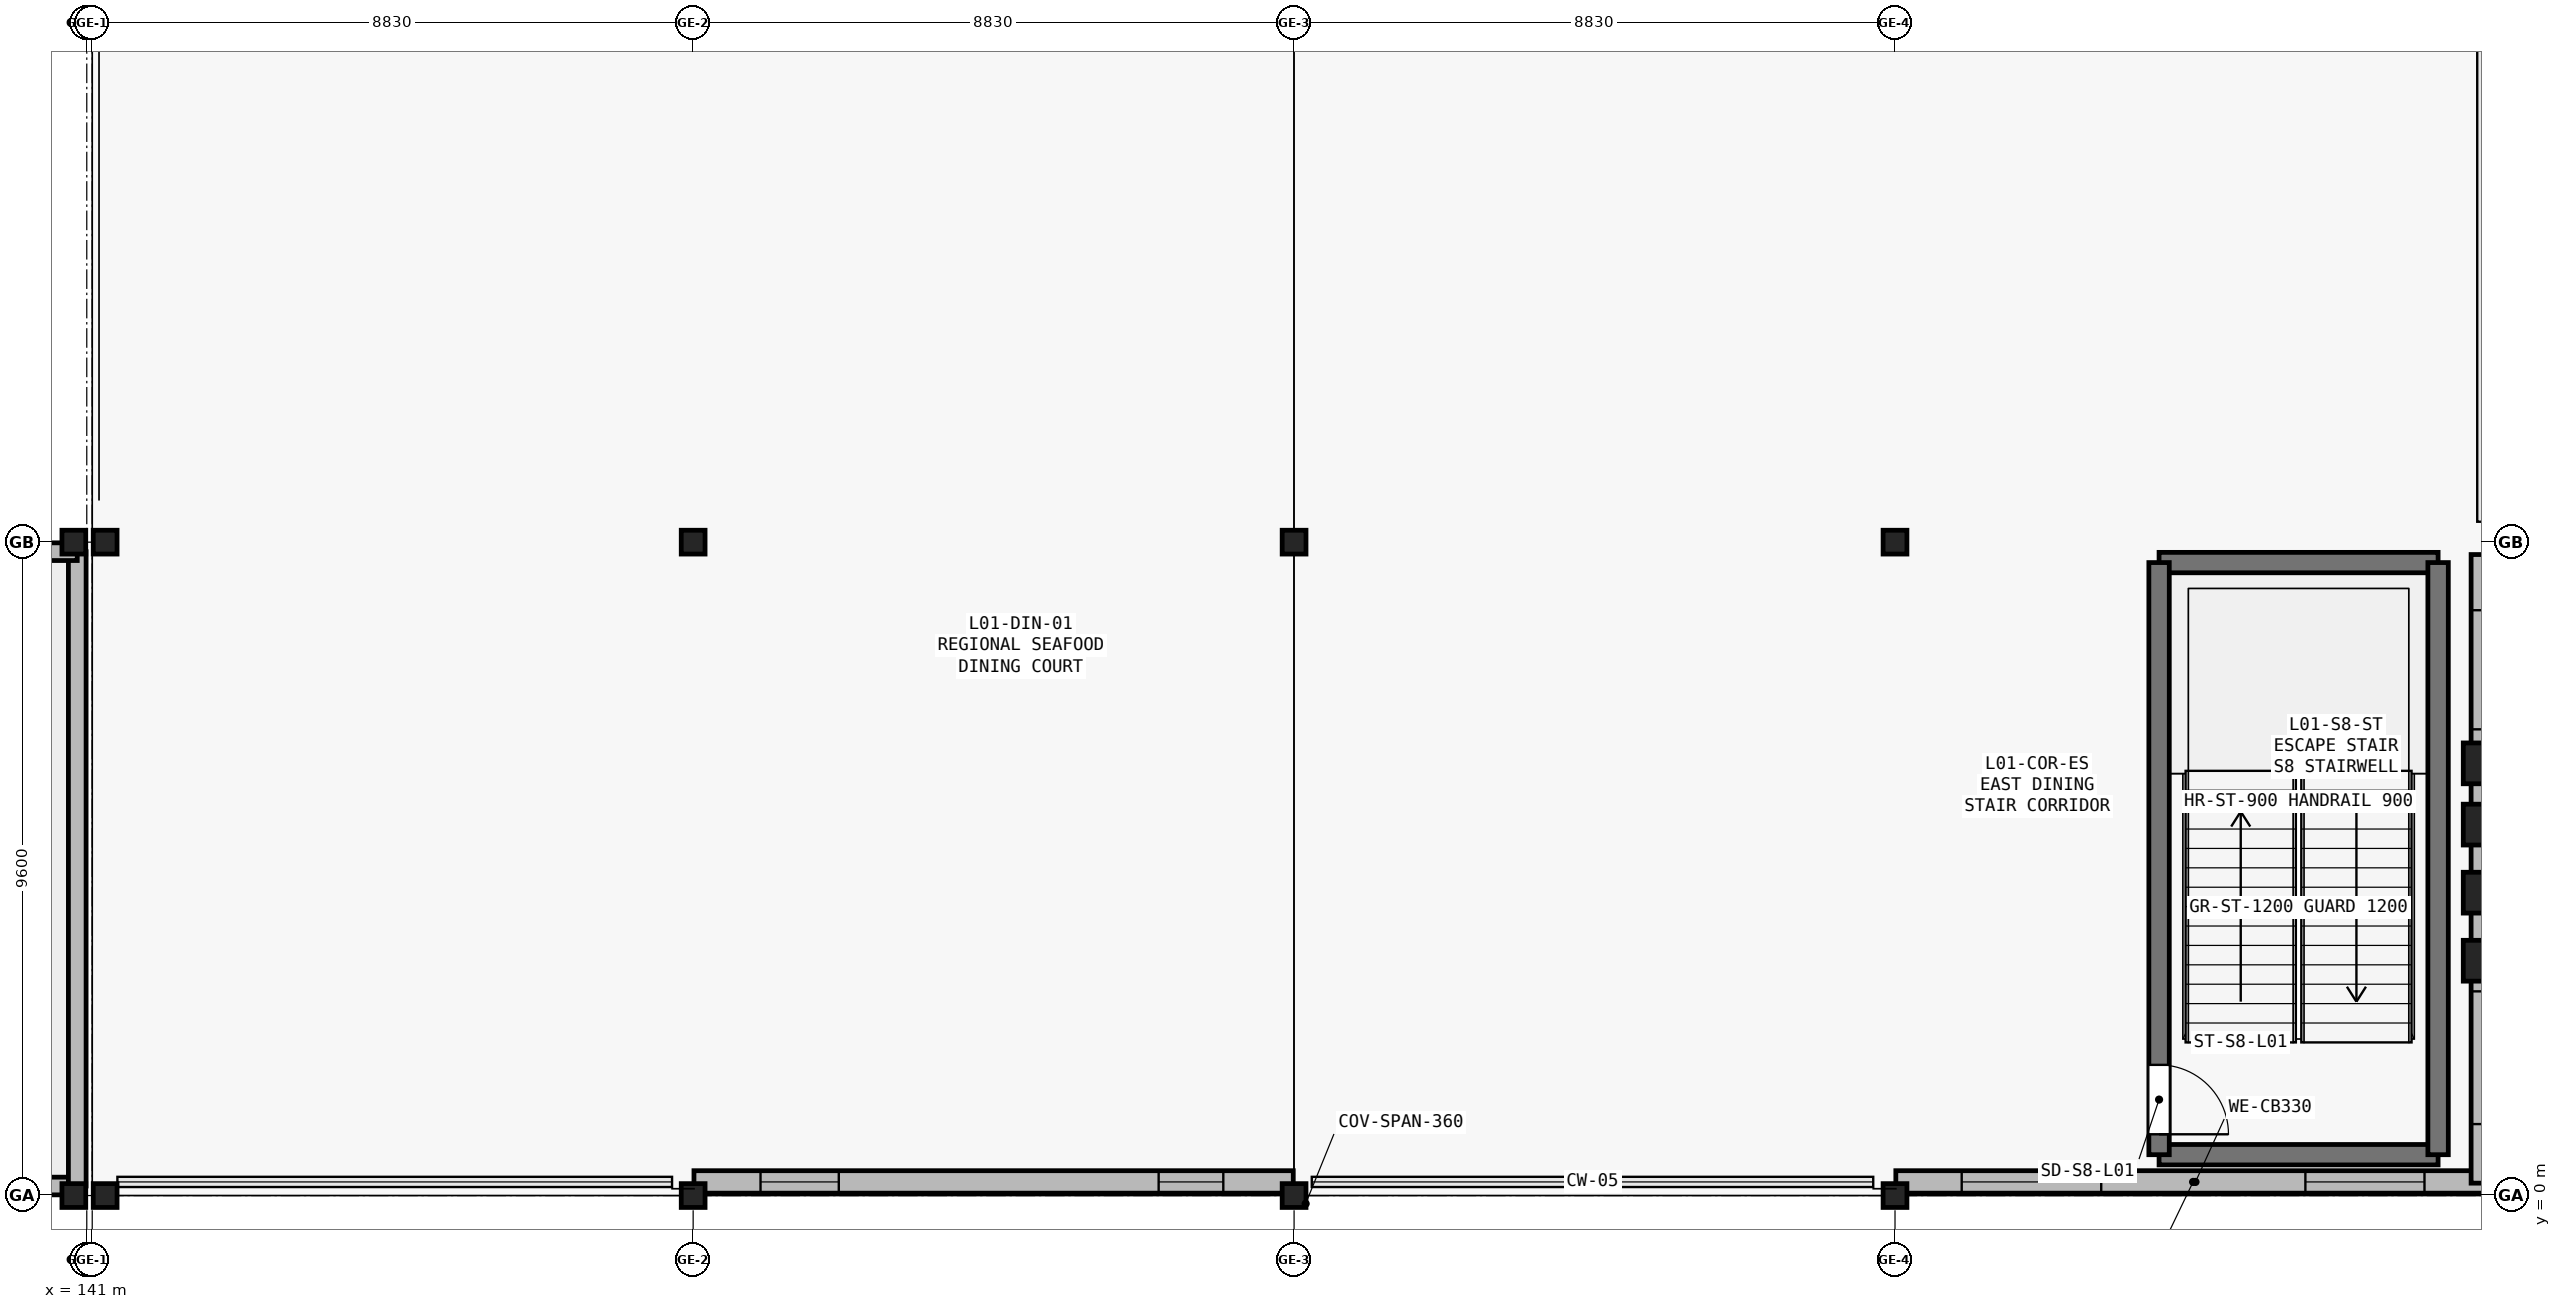
"""IFC4 building model, lengths in metres.
Left out: names, types, materials, properties, quantities, classifications, styles, units other than length and angle.
Written with IfcOpenShell. Run it as: python <this file> out.ifc"""

import sys

from ifc_helpers import new_model, si_unit, direction, frame, frame_2d, origin, origin_2d, place, context, subcontext, project, spatial, rectangle, i_section, extrude, element, fill, save


model = new_model("IFC4")
c1 = context("Model", 3, precision=1e-05, world=origin(), true_north=direction((0.0, 1.0)))
c2 = subcontext(c1, "Body", "Model", "MODEL_VIEW")
j1 = project(units=[si_unit("LENGTHUNIT", "METRE"), si_unit("PLANEANGLEUNIT", "RADIAN")], contexts=[c1])
p1 = place(None, origin())
s1 = spatial("IfcSite", under=j1, at=p1, CompositionType="ELEMENT")
p2 = place(p1, origin())
s2 = spatial("IfcBuilding", under=s1, at=p2, CompositionType="ELEMENT")
p3 = place(p2, frame((0.0, 0.0, 6.0)))
s3 = spatial("IfcBuildingStorey", under=s2, at=p3, CompositionType="ELEMENT", Elevation=6.0)
for number, where, z_axis, x_axis in (
    (1, (140.81, 0.0, 0.0), (0.0, 0.0, 1.0), (1.0, 0.0, 0.0)),
    (2, (140.81, 9.6, 0.0), (0.0, 0.0, 1.0), (1.0, 0.0, 0.0)),
    (3, (141.27, 0.0, 0.0), (0.0, 0.0, 1.0), (1.0, 0.0, 0.0)),
    (4, (141.27, 9.6, 0.0), (0.0, 0.0, 1.0), (1.0, 0.0, 0.0)),
    (5, (149.91, 0.0, 0.0), (0.0, 0.0, 1.0), (1.0, 0.0, 0.0)),
    (6, (149.91, 9.6, 0.0), (0.0, 0.0, 1.0), (1.0, 0.0, 0.0)),
    (7, (158.74, 0.0, 0.0), (0.0, 0.0, 1.0), (1.0, 0.0, 0.0)),
    (8, (158.74, 9.6, 0.0), (0.0, 0.0, 1.0), (1.0, 0.0, 0.0)),
    (9, (167.57, 0.0, 0.0), (0.0, 0.0, 1.0), (1.0, 0.0, 0.0)),
    (10, (167.57, 9.6, 0.0), (0.0, 0.0, 1.0), (1.0, 0.0, 0.0)),
):
    element("IfcColumn", number, at=place(p3, frame(where, z_axis=z_axis, x_axis=x_axis)), inside=s3, PredefinedType="COLUMN", context=c2, shape_type="SweptSolid", body=[
        extrude(i_section(OverallWidth=0.35, OverallDepth=0.35, WebThickness=0.012, FlangeThickness=0.019, FilletRadius=0.02, at=origin_2d()), origin(), (0.0, 0.0, 1.0), 4.8),
    ])
for number, where, z_axis, x_axis in (
    (11, (176.22, 3.45, 0.0), (0.0, 0.0, 1.0), (1.0, 0.0, 0.0)),
    (12, (176.22, 4.45, 0.0), (0.0, 0.0, 1.0), (1.0, 0.0, 0.0)),
    (13, (176.22, 5.45, 0.0), (0.0, 0.0, 1.0), (1.0, 0.0, 0.0)),
    (14, (176.22, 6.35, 0.0), (0.0, 0.0, 1.0), (1.0, 0.0, 0.0)),
):
    element("IfcColumn", number, at=place(p3, frame(where, z_axis=z_axis, x_axis=x_axis)), inside=s3, PredefinedType="PILASTER", context=c2, shape_type="SweptSolid", body=[
        extrude(rectangle(XDim=0.6, YDim=0.6, at=origin_2d()), origin(), (0.0, 0.0, 1.0), 4.55),
    ])
p4 = place(p3, frame((176.388, 0.2, 0.0), z_axis=(0.0, 0.0, 1.0), x_axis=(-1.0, 0.0, 0.0)))
e15 = element("IfcWall", 15, at=p4, inside=s3, PredefinedType="SOLIDWALL", context=c2, shape_type="SweptSolid", body=[
    extrude(rectangle(XDim=8.806, YDim=0.33, at=frame_2d((4.403, 0.0))), origin(), (0.0, 0.0, 1.0), 3.95),
])
p5 = place(p4, frame((1.038, 0.0, 0.95)))
e16 = element("IfcOpeningElement", 16, at=p5, cuts=e15, PredefinedType="OPENING", context=c2, shape_type="SweptSolid", body=[
    extrude(rectangle(XDim=1.75, YDim=1.5, at=frame_2d((0.875, 0.75))), frame((0.0, 0.175, 0.0), z_axis=(0.0, -1.0, 0.0), x_axis=(1.0, 0.0, 0.0)), (0.0, 0.0, 1.0), 0.35),
])
p6 = place(p4, frame((5.788, 0.0, 0.95)))
e17 = element("IfcOpeningElement", 17, at=p6, cuts=e15, PredefinedType="OPENING", context=c2, shape_type="SweptSolid", body=[
    extrude(rectangle(XDim=2.05, YDim=1.5, at=frame_2d((1.025, 0.75))), frame((0.0, 0.175, 0.0), z_axis=(0.0, -1.0, 0.0), x_axis=(1.0, 0.0, 0.0)), (0.0, 0.0, 1.0), 0.35),
])
p7 = place(p3, frame((158.728, 0.2, 0.0), z_axis=(0.0, 0.0, 1.0), x_axis=(-1.0, 0.0, 0.0)))
e18 = element("IfcWall", 18, at=p7, inside=s3, PredefinedType="SOLIDWALL", context=c2, shape_type="SweptSolid", body=[
    extrude(rectangle(XDim=8.806, YDim=0.33, at=frame_2d((4.403, 0.0))), origin(), (0.0, 0.0, 1.0), 3.95),
])
p8 = place(p7, frame((1.028, 0.0, 0.95)))
e19 = element("IfcOpeningElement", 19, at=p8, cuts=e18, PredefinedType="OPENING", context=c2, shape_type="SweptSolid", body=[
    extrude(rectangle(XDim=0.95, YDim=1.65, at=frame_2d((0.475, 0.825))), frame((0.0, 0.175, 0.0), z_axis=(0.0, -1.0, 0.0), x_axis=(1.0, 0.0, 0.0)), (0.0, 0.0, 1.0), 0.35),
])
p9 = place(p7, frame((6.678, 0.0, 0.95)))
e20 = element("IfcOpeningElement", 20, at=p9, cuts=e18, PredefinedType="OPENING", context=c2, shape_type="SweptSolid", body=[
    extrude(rectangle(XDim=1.15, YDim=1.65, at=frame_2d((0.575, 0.825))), frame((0.0, 0.175, 0.0), z_axis=(0.0, -1.0, 0.0), x_axis=(1.0, 0.0, 0.0)), (0.0, 0.0, 1.0), 0.35),
])
p10 = place(p3, frame((176.2, 9.418, 0.0), z_axis=(0.0, 0.0, 1.0), x_axis=(0.0, -1.0, 0.0)))
e21 = element("IfcWall", 21, at=p10, inside=s3, PredefinedType="SOLIDWALL", context=c2, shape_type="SweptSolid", body=[
    extrude(rectangle(XDim=9.236, YDim=0.33, at=frame_2d((4.618, 0.0))), origin(), (0.0, 0.0, 1.0), 3.95),
])
p11 = place(p10, frame((0.818, 0.0, 0.95)))
e22 = element("IfcOpeningElement", 22, at=p11, cuts=e21, PredefinedType="OPENING", context=c2, shape_type="SweptSolid", body=[
    extrude(rectangle(XDim=1.75, YDim=1.65, at=frame_2d((0.875, 0.825))), frame((0.0, 0.175, 0.0), z_axis=(0.0, -1.0, 0.0), x_axis=(1.0, 0.0, 0.0)), (0.0, 0.0, 1.0), 0.35),
])
p12 = place(p10, frame((6.418, 0.0, 0.95)))
e23 = element("IfcOpeningElement", 23, at=p12, cuts=e21, PredefinedType="OPENING", context=c2, shape_type="SweptSolid", body=[
    extrude(rectangle(XDim=1.95, YDim=1.65, at=frame_2d((0.975, 0.825))), frame((0.0, 0.175, 0.0), z_axis=(0.0, -1.0, 0.0), x_axis=(1.0, 0.0, 0.0)), (0.0, 0.0, 1.0), 0.35),
])
p13 = place(p3, frame((112.34, 0.14, 0.01), z_axis=(0.0, 0.0, 1.0), x_axis=(1.0, 0.0, 0.0)))
e24 = element("IfcWall", 24, at=p13, inside=s3, PredefinedType="PARAPET", context=c2, shape_type="SweptSolid", body=[
    extrude(rectangle(XDim=28.52, YDim=0.26, at=frame_2d((14.26, 0.0))), origin(), (0.0, 0.0, 1.0), 1.15),
])
p14 = place(p3, frame((140.86, 0.14, 0.01), z_axis=(0.0, 0.0, 1.0), x_axis=(0.0, 1.0, 0.0)))
e25 = element("IfcWall", 25, at=p14, inside=s3, PredefinedType="PARAPET", context=c2, shape_type="SweptSolid", body=[
    extrude(rectangle(XDim=9.32, YDim=0.26, at=frame_2d((4.66, 0.0))), origin(), (0.0, 0.0, 1.0), 1.15),
])
p15 = place(p3, frame((140.86, 9.46, 0.01), z_axis=(0.0, 0.0, 1.0), x_axis=(-1.0, 0.0, 0.0)))
e26 = element("IfcWall", 26, at=p15, inside=s3, PredefinedType="PARAPET", context=c2, shape_type="SweptSolid", body=[
    extrude(rectangle(XDim=28.52, YDim=0.26, at=frame_2d((14.26, 0.0))), origin(), (0.0, 0.0, 1.0), 1.15),
])
for number, where, z_axis, x_axis in (
    (27, (171.45, 0.6, 0.0), (0.0, 0.0, 1.0), (1.0, 0.0, 0.0)),
    (28, (175.55, 9.3, 0.0), (0.0, 0.0, 1.0), (-1.0, 0.0, 0.0)),
):
    element("IfcWall", number, at=place(p3, frame(where, z_axis=z_axis, x_axis=x_axis)), inside=s3, PredefinedType="SHEAR", context=c2, shape_type="SweptSolid", body=[
        extrude(rectangle(XDim=4.1, YDim=0.3, at=frame_2d((2.05, 0.0))), origin(), (0.0, 0.0, 1.0), 4.8),
    ])
p16 = place(p3, frame((171.45, 9.3, 0.0), z_axis=(0.0, 0.0, 1.0), x_axis=(0.0, -1.0, 0.0)))
e29 = element("IfcWall", 29, at=p16, inside=s3, PredefinedType="SHEAR", context=c2, shape_type="SweptSolid", body=[
    extrude(rectangle(XDim=8.7, YDim=0.3, at=frame_2d((4.35, 0.0))), origin(), (0.0, 0.0, 1.0), 4.8),
])
p17 = place(p16, frame((7.38, 0.0, 0.0)))
e30 = element("IfcOpeningElement", 30, at=p17, cuts=e29, PredefinedType="OPENING", context=c2, shape_type="SweptSolid", body=[
    extrude(rectangle(XDim=1.02, YDim=2.1, at=frame_2d((0.51, 1.05))), frame((0.0, 0.16, 0.0), z_axis=(0.0, -1.0, 0.0), x_axis=(1.0, 0.0, 0.0)), (0.0, 0.0, 1.0), 0.32),
])
p18 = place(p3, frame((175.55, 0.6, 0.0), z_axis=(0.0, 0.0, 1.0), x_axis=(0.0, 1.0, 0.0)))
e31 = element("IfcWall", 31, at=p18, inside=s3, PredefinedType="SHEAR", context=c2, shape_type="SweptSolid", body=[
    extrude(rectangle(XDim=8.7, YDim=0.3, at=frame_2d((4.35, 0.0))), origin(), (0.0, 0.0, 1.0), 4.8),
])
p19 = place(p5, origin())
e32 = element("IfcWindow", 32, at=p19, inside=s3, PartitioningType="SINGLE_PANEL", PredefinedType="WINDOW", context=c2, shape_type="SweptSolid", body=[
    extrude(rectangle(XDim=1.75, YDim=1.5, at=frame_2d((0.875, 0.75))), frame((0.0, 0.03, 0.0), z_axis=(0.0, -1.0, 0.0), x_axis=(1.0, 0.0, 0.0)), (0.0, 0.0, 1.0), 0.06),
])
fill(e16, e32)
p20 = place(p6, origin())
e33 = element("IfcWindow", 33, at=p20, inside=s3, PartitioningType="SINGLE_PANEL", PredefinedType="WINDOW", context=c2, shape_type="SweptSolid", body=[
    extrude(rectangle(XDim=2.05, YDim=1.5, at=frame_2d((1.025, 0.75))), frame((0.0, 0.03, 0.0), z_axis=(0.0, -1.0, 0.0), x_axis=(1.0, 0.0, 0.0)), (0.0, 0.0, 1.0), 0.06),
])
fill(e17, e33)
p21 = place(p8, origin())
e34 = element("IfcWindow", 34, at=p21, inside=s3, PartitioningType="SINGLE_PANEL", PredefinedType="WINDOW", context=c2, shape_type="SweptSolid", body=[
    extrude(rectangle(XDim=0.95, YDim=1.65, at=frame_2d((0.475, 0.825))), frame((0.0, 0.03, 0.0), z_axis=(0.0, -1.0, 0.0), x_axis=(1.0, 0.0, 0.0)), (0.0, 0.0, 1.0), 0.06),
])
fill(e19, e34)
p22 = place(p9, origin())
e35 = element("IfcWindow", 35, at=p22, inside=s3, PartitioningType="SINGLE_PANEL", PredefinedType="WINDOW", context=c2, shape_type="SweptSolid", body=[
    extrude(rectangle(XDim=1.15, YDim=1.65, at=frame_2d((0.575, 0.825))), frame((0.0, 0.03, 0.0), z_axis=(0.0, -1.0, 0.0), x_axis=(1.0, 0.0, 0.0)), (0.0, 0.0, 1.0), 0.06),
])
fill(e20, e35)
p23 = place(p11, origin())
e36 = element("IfcWindow", 36, at=p23, inside=s3, PartitioningType="SINGLE_PANEL", PredefinedType="WINDOW", context=c2, shape_type="SweptSolid", body=[
    extrude(rectangle(XDim=1.75, YDim=1.65, at=frame_2d((0.875, 0.825))), frame((0.0, 0.03, 0.0), z_axis=(0.0, -1.0, 0.0), x_axis=(1.0, 0.0, 0.0)), (0.0, 0.0, 1.0), 0.06),
])
fill(e22, e36)
p24 = place(p12, origin())
e37 = element("IfcWindow", 37, at=p24, inside=s3, PartitioningType="SINGLE_PANEL", PredefinedType="WINDOW", context=c2, shape_type="SweptSolid", body=[
    extrude(rectangle(XDim=1.95, YDim=1.65, at=frame_2d((0.975, 0.825))), frame((0.0, 0.03, 0.0), z_axis=(0.0, -1.0, 0.0), x_axis=(1.0, 0.0, 0.0)), (0.0, 0.0, 1.0), 0.06),
])
fill(e23, e37)
p25 = place(p17, origin())
e38 = element("IfcDoor", 38, at=p25, inside=s3, OperationType="SINGLE_SWING_RIGHT", PredefinedType="DOOR", context=c2, shape_type="SweptSolid", body=[
    extrude(rectangle(XDim=1.02, YDim=2.1, at=frame_2d((0.51, 1.05))), frame((0.0, 0.025, 0.0), z_axis=(0.0, -1.0, 0.0), x_axis=(1.0, 0.0, 0.0)), (0.0, 0.0, 1.0), 0.05),
])
fill(e30, e38)
save(model, sys.argv[1])
